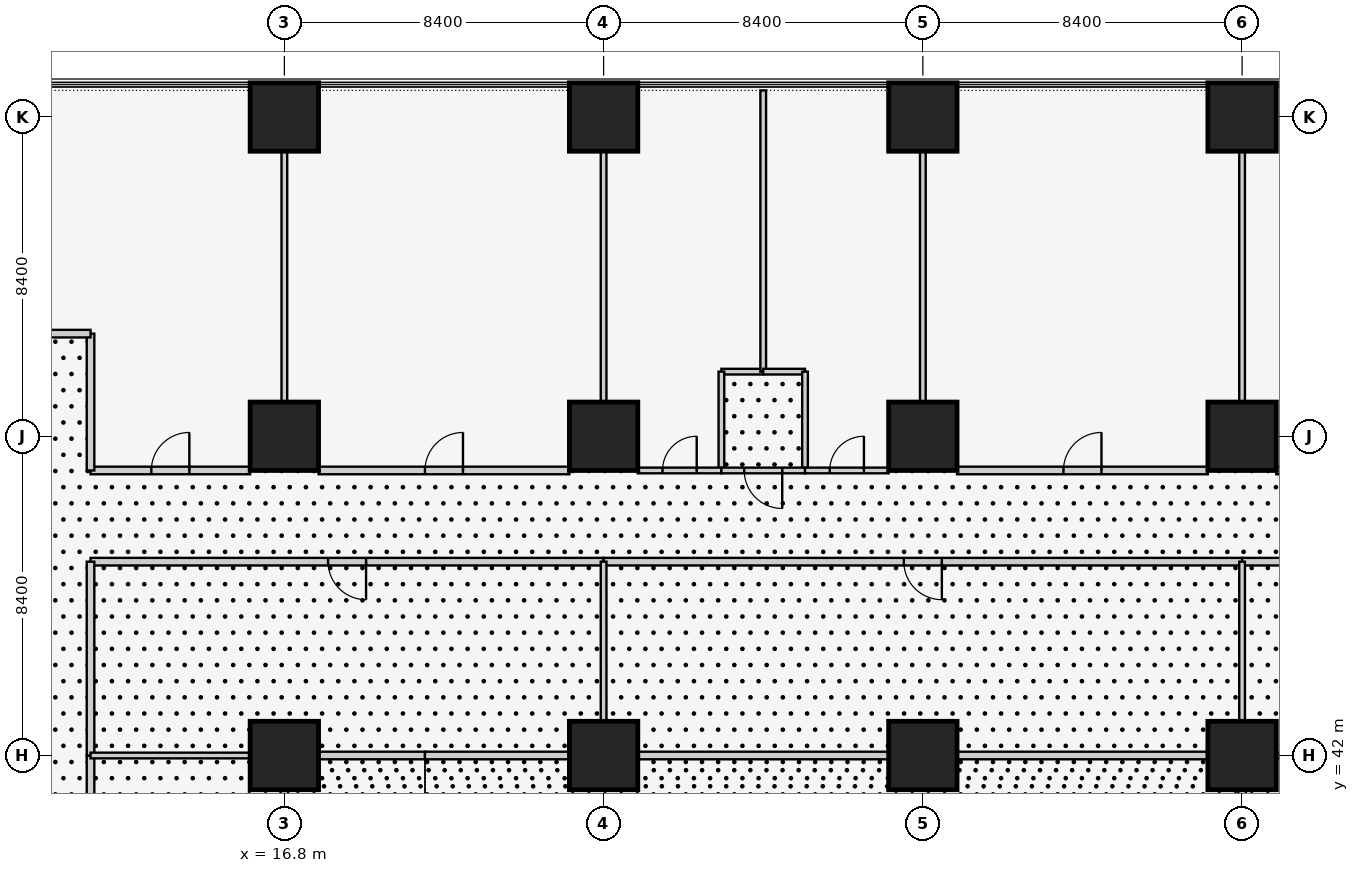
"""IFC4 building model, lengths in metres.
Left out: names, types, materials, properties, quantities, classifications, styles, units other than length and angle.
Written with IfcOpenShell. Run it as: python <this file> out.ifc"""

import sys

from ifc_helpers import new_model, si_unit, direction, frame, frame_2d, origin, origin_2d, place, context, subcontext, project, spatial, rectangle, extrude, element, fill, save


model = new_model("IFC4")
c1 = context("Model", 3, precision=1e-05, world=origin(), true_north=direction((0.0, 1.0)))
c2 = subcontext(c1, "Body", "Model", "MODEL_VIEW")
j1 = project(units=[si_unit("LENGTHUNIT", "METRE"), si_unit("PLANEANGLEUNIT", "RADIAN")], contexts=[c1])
p1 = place(None, origin())
s1 = spatial("IfcSite", under=j1, at=p1, CompositionType="ELEMENT")
p2 = place(p1, origin())
s2 = spatial("IfcBuilding", under=s1, at=p2, CompositionType="ELEMENT")
p3 = place(p2, frame((0.0, 0.0, 6.0)))
s3 = spatial("IfcBuildingStorey", under=s2, at=p3, CompositionType="ELEMENT", Elevation=6.0)
for number, where, z_axis, x_axis in (
    (1, (16.8, 42.0, 0.0), (0.0, 0.0, 1.0), (1.0, 0.0, 0.0)),
    (2, (16.8, 50.4, 0.0), (0.0, 0.0, 1.0), (1.0, 0.0, 0.0)),
    (3, (16.8, 58.8, 0.0), (0.0, 0.0, 1.0), (1.0, 0.0, 0.0)),
    (4, (25.2, 42.0, 0.0), (0.0, 0.0, 1.0), (1.0, 0.0, 0.0)),
    (5, (25.2, 50.4, 0.0), (0.0, 0.0, 1.0), (1.0, 0.0, 0.0)),
    (6, (25.2, 58.8, 0.0), (0.0, 0.0, 1.0), (1.0, 0.0, 0.0)),
    (7, (33.6, 42.0, 0.0), (0.0, 0.0, 1.0), (1.0, 0.0, 0.0)),
    (8, (33.6, 50.4, 0.0), (0.0, 0.0, 1.0), (1.0, 0.0, 0.0)),
    (9, (33.6, 58.8, 0.0), (0.0, 0.0, 1.0), (1.0, 0.0, 0.0)),
    (10, (42.0, 42.0, 0.0), (0.0, 0.0, 1.0), (1.0, 0.0, 0.0)),
    (11, (42.0, 50.4, 0.0), (0.0, 0.0, 1.0), (1.0, 0.0, 0.0)),
    (12, (42.0, 58.8, 0.0), (0.0, 0.0, 1.0), (1.0, 0.0, 0.0)),
):
    element("IfcColumn", number, at=place(p3, frame(where, z_axis=z_axis, x_axis=x_axis)), inside=s3, PredefinedType="COLUMN", context=c2, shape_type="SweptSolid", body=[
        extrude(rectangle(XDim=1.8, YDim=1.8, at=origin_2d()), origin(), (0.0, 0.0, 1.0), 4.5),
    ])
p4 = place(p3, frame((29.4, 52.1, 0.0), z_axis=(0.0, 0.0, 1.0), x_axis=(-1.0, 0.0, 0.0)))
e13 = element("IfcWall", 13, at=p4, inside=s3, PredefinedType="PARTITIONING", context=c2, shape_type="SweptSolid", body=[
    extrude(rectangle(XDim=1.1, YDim=0.15, at=frame_2d((0.55, 0.0))), origin(), (0.0, 0.0, 1.0), 4.3),
])
p5 = place(p3, frame((28.3, 52.1, 0.0), z_axis=(0.0, 0.0, 1.0), x_axis=(0.0, -1.0, 0.0)))
e14 = element("IfcWall", 14, at=p5, inside=s3, PredefinedType="PARTITIONING", context=c2, shape_type="SweptSolid", body=[
    extrude(rectangle(XDim=2.6, YDim=0.15, at=frame_2d((1.3, 0.0))), origin(), (0.0, 0.0, 1.0), 4.3),
])
p6 = place(p3, frame((29.4, 59.5, 0.0), z_axis=(0.0, 0.0, 1.0), x_axis=(0.0, -1.0, 0.0)))
e15 = element("IfcWall", 15, at=p6, inside=s3, PredefinedType="PARTITIONING", context=c2, shape_type="SweptSolid", body=[
    extrude(rectangle(XDim=7.4, YDim=0.15, at=frame_2d((3.7, 0.0))), origin(), (0.0, 0.0, 1.0), 3.688),
])
p7 = place(p3, frame((25.2, 51.3, 0.0), z_axis=(0.0, 0.0, 1.0), x_axis=(0.0, 1.0, 0.0)))
e16 = element("IfcWall", 16, at=p7, inside=s3, PredefinedType="PARTITIONING", context=c2, shape_type="SweptSolid", body=[
    extrude(rectangle(XDim=6.6, YDim=0.15, at=frame_2d((3.3, 0.0))), origin(), (0.0, 0.0, 1.0), 3.543),
])
p8 = place(p3, frame((28.3, 49.5, 0.0), z_axis=(0.0, 0.0, 1.0), x_axis=(-1.0, 0.0, 0.0)))
e17 = element("IfcWall", 17, at=p8, inside=s3, PredefinedType="PARTITIONING", context=c2, shape_type="SweptSolid", body=[
    extrude(rectangle(XDim=2.2, YDim=0.15, at=frame_2d((1.1, 0.0))), origin(), (0.0, 0.0, 1.0), 4.3),
])
p9 = place(p8, frame((0.65, 0.0, 0.0)))
e18 = element("IfcOpeningElement", 18, at=p9, cuts=e17, PredefinedType="OPENING", context=c2, shape_type="SweptSolid", body=[
    extrude(rectangle(XDim=0.9, YDim=2.1, at=frame_2d((0.45, 1.05))), frame((0.0, 0.085, 0.0), z_axis=(0.0, -1.0, 0.0), x_axis=(1.0, 0.0, 0.0)), (0.0, 0.0, 1.0), 0.17),
])
p10 = place(p3, frame((29.4, 52.1, 0.0), z_axis=(0.0, 0.0, 1.0), x_axis=(1.0, 0.0, 0.0)))
e19 = element("IfcWall", 19, at=p10, inside=s3, PredefinedType="PARTITIONING", context=c2, shape_type="SweptSolid", body=[
    extrude(rectangle(XDim=1.1, YDim=0.15, at=frame_2d((0.55, 0.0))), origin(), (0.0, 0.0, 1.0), 4.3),
])
p11 = place(p3, frame((30.5, 52.1, 0.0), z_axis=(0.0, 0.0, 1.0), x_axis=(0.0, -1.0, 0.0)))
e20 = element("IfcWall", 20, at=p11, inside=s3, PredefinedType="PARTITIONING", context=c2, shape_type="SweptSolid", body=[
    extrude(rectangle(XDim=2.6, YDim=0.15, at=frame_2d((1.3, 0.0))), origin(), (0.0, 0.0, 1.0), 4.3),
])
p12 = place(p3, frame((30.5, 49.5, 0.0), z_axis=(0.0, 0.0, 1.0), x_axis=(-1.0, 0.0, 0.0)))
e21 = element("IfcWall", 21, at=p12, inside=s3, PredefinedType="PARTITIONING", context=c2, shape_type="SweptSolid", body=[
    extrude(rectangle(XDim=2.2, YDim=0.15, at=frame_2d((1.1, 0.0))), origin(), (0.0, 0.0, 1.0), 4.3),
])
p13 = place(p12, frame((0.6, 0.0, 0.0)))
e22 = element("IfcOpeningElement", 22, at=p13, cuts=e21, PredefinedType="OPENING", context=c2, shape_type="SweptSolid", body=[
    extrude(rectangle(XDim=1.0, YDim=2.1, at=frame_2d((0.5, 1.05))), frame((0.0, 0.085, 0.0), z_axis=(0.0, -1.0, 0.0), x_axis=(1.0, 0.0, 0.0)), (0.0, 0.0, 1.0), 0.17),
])
p14 = place(p3, frame((33.6, 57.9, 0.0), z_axis=(0.0, 0.0, 1.0), x_axis=(0.0, -1.0, 0.0)))
e23 = element("IfcWall", 23, at=p14, inside=s3, PredefinedType="PARTITIONING", context=c2, shape_type="SweptSolid", body=[
    extrude(rectangle(XDim=6.6, YDim=0.15, at=frame_2d((3.3, 0.0))), origin(), (0.0, 0.0, 1.0), 3.543),
])
p15 = place(p3, frame((32.7, 49.5, 0.0), z_axis=(0.0, 0.0, 1.0), x_axis=(-1.0, 0.0, 0.0)))
e24 = element("IfcWall", 24, at=p15, inside=s3, PredefinedType="PARTITIONING", context=c2, shape_type="SweptSolid", body=[
    extrude(rectangle(XDim=2.2, YDim=0.15, at=frame_2d((1.1, 0.0))), origin(), (0.0, 0.0, 1.0), 4.3),
])
p16 = place(p15, frame((0.65, 0.0, 0.0)))
e25 = element("IfcOpeningElement", 25, at=p16, cuts=e24, PredefinedType="OPENING", context=c2, shape_type="SweptSolid", body=[
    extrude(rectangle(XDim=0.9, YDim=2.1, at=frame_2d((0.45, 1.05))), frame((0.0, 0.085, 0.0), z_axis=(0.0, -1.0, 0.0), x_axis=(1.0, 0.0, 0.0)), (0.0, 0.0, 1.0), 0.17),
])
p17 = place(p3, frame((16.8, 51.3, 0.0), z_axis=(0.0, 0.0, 1.0), x_axis=(0.0, 1.0, 0.0)))
e26 = element("IfcWall", 26, at=p17, inside=s3, PredefinedType="PARTITIONING", context=c2, shape_type="SweptSolid", body=[
    extrude(rectangle(XDim=6.6, YDim=0.15, at=frame_2d((3.3, 0.0))), origin(), (0.0, 0.0, 1.0), 3.543),
])
p18 = place(p3, frame((24.3, 49.5, 0.0), z_axis=(0.0, 0.0, 1.0), x_axis=(-1.0, 0.0, 0.0)))
e27 = element("IfcWall", 27, at=p18, inside=s3, PredefinedType="PARTITIONING", context=c2, shape_type="SweptSolid", body=[
    extrude(rectangle(XDim=6.6, YDim=0.2, at=frame_2d((3.3, 0.0))), origin(), (0.0, 0.0, 1.0), 4.3),
])
p19 = place(p18, frame((2.8, 0.0, 0.0)))
e28 = element("IfcOpeningElement", 28, at=p19, cuts=e27, PredefinedType="OPENING", context=c2, shape_type="SweptSolid", body=[
    extrude(rectangle(XDim=1.0, YDim=2.1, at=frame_2d((0.5, 1.05))), frame((0.0, 0.11, 0.0), z_axis=(0.0, -1.0, 0.0), x_axis=(1.0, 0.0, 0.0)), (0.0, 0.0, 1.0), 0.22),
])
p20 = place(p3, frame((42.0, 57.9, 0.0), z_axis=(0.0, 0.0, 1.0), x_axis=(0.0, -1.0, 0.0)))
e29 = element("IfcWall", 29, at=p20, inside=s3, PredefinedType="PARTITIONING", context=c2, shape_type="SweptSolid", body=[
    extrude(rectangle(XDim=6.6, YDim=0.15, at=frame_2d((3.3, 0.0))), origin(), (0.0, 0.0, 1.0), 3.543),
])
p21 = place(p3, frame((41.1, 49.5, 0.0), z_axis=(0.0, 0.0, 1.0), x_axis=(-1.0, 0.0, 0.0)))
e30 = element("IfcWall", 30, at=p21, inside=s3, PredefinedType="PARTITIONING", context=c2, shape_type="SweptSolid", body=[
    extrude(rectangle(XDim=6.6, YDim=0.2, at=frame_2d((3.3, 0.0))), origin(), (0.0, 0.0, 1.0), 4.3),
])
p22 = place(p21, frame((2.8, 0.0, 0.0)))
e31 = element("IfcOpeningElement", 31, at=p22, cuts=e30, PredefinedType="OPENING", context=c2, shape_type="SweptSolid", body=[
    extrude(rectangle(XDim=1.0, YDim=2.1, at=frame_2d((0.5, 1.05))), frame((0.0, 0.11, 0.0), z_axis=(0.0, -1.0, 0.0), x_axis=(1.0, 0.0, 0.0)), (0.0, 0.0, 1.0), 0.22),
])
p23 = place(p3, frame((15.9, 49.5, 0.0), z_axis=(0.0, 0.0, 1.0), x_axis=(-1.0, 0.0, 0.0)))
e32 = element("IfcWall", 32, at=p23, inside=s3, PredefinedType="PARTITIONING", context=c2, shape_type="SweptSolid", body=[
    extrude(rectangle(XDim=4.2, YDim=0.2, at=frame_2d((2.1, 0.0))), origin(), (0.0, 0.0, 1.0), 4.3),
])
p24 = place(p23, frame((1.6, 0.0, 0.0)))
e33 = element("IfcOpeningElement", 33, at=p24, cuts=e32, PredefinedType="OPENING", context=c2, shape_type="SweptSolid", body=[
    extrude(rectangle(XDim=1.0, YDim=2.1, at=frame_2d((0.5, 1.05))), frame((0.0, 0.11, 0.0), z_axis=(0.0, -1.0, 0.0), x_axis=(1.0, 0.0, 0.0)), (0.0, 0.0, 1.0), 0.22),
])
p25 = place(p3, frame((11.7, 49.5, 0.0), z_axis=(0.0, 0.0, 1.0), x_axis=(0.0, 1.0, 0.0)))
e34 = element("IfcWall", 34, at=p25, inside=s3, PredefinedType="PARTITIONING", context=c2, shape_type="SweptSolid", body=[
    extrude(rectangle(XDim=3.6, YDim=0.2, at=frame_2d((1.8, 0.0))), origin(), (0.0, 0.0, 1.0), 4.3),
])
p26 = place(p3, frame((11.7, 53.1, 0.0), z_axis=(0.0, 0.0, 1.0), x_axis=(-1.0, 0.0, 0.0)))
e35 = element("IfcWall", 35, at=p26, inside=s3, PredefinedType="PARTITIONING", context=c2, shape_type="SweptSolid", body=[
    extrude(rectangle(XDim=2.4, YDim=0.2, at=frame_2d((1.2, 0.0))), origin(), (0.0, 0.0, 1.0), 4.3),
])
p27 = place(p3, frame((47.1, 49.5, 0.0), z_axis=(0.0, 0.0, 1.0), x_axis=(-1.0, 0.0, 0.0)))
e36 = element("IfcWall", 36, at=p27, inside=s3, PredefinedType="PARTITIONING", context=c2, shape_type="SweptSolid", body=[
    extrude(rectangle(XDim=4.2, YDim=0.2, at=frame_2d((2.1, 0.0))), origin(), (0.0, 0.0, 1.0), 4.3),
])
p28 = place(p27, frame((1.6, 0.0, 0.0)))
e37 = element("IfcOpeningElement", 37, at=p28, cuts=e36, PredefinedType="OPENING", context=c2, shape_type="SweptSolid", body=[
    extrude(rectangle(XDim=1.0, YDim=2.1, at=frame_2d((0.5, 1.05))), frame((0.0, 0.11, 0.0), z_axis=(0.0, -1.0, 0.0), x_axis=(1.0, 0.0, 0.0)), (0.0, 0.0, 1.0), 0.22),
])
p29 = place(p3, frame((11.7, 42.0, 0.0), z_axis=(0.0, 0.0, 1.0), x_axis=(0.0, -1.0, 0.0)))
e38 = element("IfcWall", 38, at=p29, inside=s3, PredefinedType="PARTITIONING", context=c2, shape_type="SweptSolid", body=[
    extrude(rectangle(XDim=8.4, YDim=0.2, at=frame_2d((4.2, 0.0))), origin(), (0.0, 0.0, 1.0), 4.3),
])
p30 = place(p29, frame((3.7, 0.0, 0.0)))
e39 = element("IfcOpeningElement", 39, at=p30, cuts=e38, PredefinedType="OPENING", context=c2, shape_type="SweptSolid", body=[
    extrude(rectangle(XDim=1.0, YDim=2.1, at=frame_2d((0.5, 1.05))), frame((0.0, 0.11, 0.0), z_axis=(0.0, -1.0, 0.0), x_axis=(1.0, 0.0, 0.0)), (0.0, 0.0, 1.0), 0.22),
])
p31 = place(p3, frame((25.2, 47.1, 0.0), z_axis=(0.0, 0.0, 1.0), x_axis=(-1.0, 0.0, 0.0)))
e40 = element("IfcWall", 40, at=p31, inside=s3, PredefinedType="PARTITIONING", context=c2, shape_type="SweptSolid", body=[
    extrude(rectangle(XDim=13.5, YDim=0.2, at=frame_2d((6.75, 0.0))), origin(), (0.0, 0.0, 1.0), 4.3),
])
p32 = place(p31, frame((6.25, 0.0, 0.0)))
e41 = element("IfcOpeningElement", 41, at=p32, cuts=e40, PredefinedType="OPENING", context=c2, shape_type="SweptSolid", body=[
    extrude(rectangle(XDim=1.0, YDim=2.1, at=frame_2d((0.5, 1.05))), frame((0.0, 0.11, 0.0), z_axis=(0.0, -1.0, 0.0), x_axis=(1.0, 0.0, 0.0)), (0.0, 0.0, 1.0), 0.22),
])
p33 = place(p3, frame((11.7, 47.1, 0.0), z_axis=(0.0, 0.0, 1.0), x_axis=(0.0, -1.0, 0.0)))
e42 = element("IfcWall", 42, at=p33, inside=s3, PredefinedType="PARTITIONING", context=c2, shape_type="SweptSolid", body=[
    extrude(rectangle(XDim=5.1, YDim=0.2, at=frame_2d((2.55, 0.0))), origin(), (0.0, 0.0, 1.0), 4.3),
])
p34 = place(p3, frame((42.0, 47.1, 0.0), z_axis=(0.0, 0.0, 1.0), x_axis=(-1.0, 0.0, 0.0)))
e43 = element("IfcWall", 43, at=p34, inside=s3, PredefinedType="PARTITIONING", context=c2, shape_type="SweptSolid", body=[
    extrude(rectangle(XDim=16.8, YDim=0.2, at=frame_2d((8.4, 0.0))), origin(), (0.0, 0.0, 1.0), 4.3),
])
p35 = place(p34, frame((7.9, 0.0, 0.0)))
e44 = element("IfcOpeningElement", 44, at=p35, cuts=e43, PredefinedType="OPENING", context=c2, shape_type="SweptSolid", body=[
    extrude(rectangle(XDim=1.0, YDim=2.1, at=frame_2d((0.5, 1.05))), frame((0.0, 0.11, 0.0), z_axis=(0.0, -1.0, 0.0), x_axis=(1.0, 0.0, 0.0)), (0.0, 0.0, 1.0), 0.22),
])
p36 = place(p3, frame((47.1, 47.1, 0.0), z_axis=(0.0, 0.0, 1.0), x_axis=(-1.0, 0.0, 0.0)))
e45 = element("IfcWall", 45, at=p36, inside=s3, PredefinedType="PARTITIONING", context=c2, shape_type="SweptSolid", body=[
    extrude(rectangle(XDim=5.1, YDim=0.2, at=frame_2d((2.55, 0.0))), origin(), (0.0, 0.0, 1.0), 4.3),
])
p37 = place(p3, frame((16.8, 34.5, 0.0), z_axis=(0.0, 0.0, 1.0), x_axis=(0.0, 1.0, 0.0)))
e46 = element("IfcWall", 46, at=p37, inside=s3, PredefinedType="PARTITIONING", context=c2, shape_type="SweptSolid", body=[
    extrude(rectangle(XDim=6.6, YDim=0.2, at=frame_2d((3.3, 0.0))), origin(), (0.0, 0.0, 1.0), 3.543),
])
p38 = place(p3, frame((17.7, 42.0, 0.0), z_axis=(0.0, 0.0, 1.0), x_axis=(1.0, 0.0, 0.0)))
e47 = element("IfcWall", 47, at=p38, inside=s3, PredefinedType="PARTITIONING", context=c2, shape_type="SweptSolid", body=[
    extrude(rectangle(XDim=2.8, YDim=0.2, at=frame_2d((1.4, 0.0))), origin(), (0.0, 0.0, 1.0), 3.543),
])
p39 = place(p3, frame((42.0, 41.1, 0.0), z_axis=(0.0, 0.0, 1.0), x_axis=(0.0, -1.0, 0.0)))
e48 = element("IfcWall", 48, at=p39, inside=s3, PredefinedType="PARTITIONING", context=c2, shape_type="SweptSolid", body=[
    extrude(rectangle(XDim=6.6, YDim=0.2, at=frame_2d((3.3, 0.0))), origin(), (0.0, 0.0, 1.0), 3.543),
])
p40 = place(p3, frame((20.5, 42.0, 0.0), z_axis=(0.0, 0.0, 1.0), x_axis=(1.0, 0.0, 0.0)))
e49 = element("IfcWall", 49, at=p40, inside=s3, PredefinedType="PARTITIONING", context=c2, shape_type="SweptSolid", body=[
    extrude(rectangle(XDim=3.8, YDim=0.2, at=frame_2d((1.9, 0.0))), origin(), (0.0, 0.0, 1.0), 3.543),
])
p41 = place(p3, frame((26.1, 42.0, 0.0), z_axis=(0.0, 0.0, 1.0), x_axis=(1.0, 0.0, 0.0)))
e50 = element("IfcWall", 50, at=p41, inside=s3, PredefinedType="PARTITIONING", context=c2, shape_type="SweptSolid", body=[
    extrude(rectangle(XDim=6.6, YDim=0.2, at=frame_2d((3.3, 0.0))), origin(), (0.0, 0.0, 1.0), 3.543),
])
p42 = place(p3, frame((34.5, 42.0, 0.0), z_axis=(0.0, 0.0, 1.0), x_axis=(1.0, 0.0, 0.0)))
e51 = element("IfcWall", 51, at=p42, inside=s3, PredefinedType="PARTITIONING", context=c2, shape_type="SweptSolid", body=[
    extrude(rectangle(XDim=6.6, YDim=0.2, at=frame_2d((3.3, 0.0))), origin(), (0.0, 0.0, 1.0), 3.543),
])
p43 = place(p3, frame((11.7, 42.0, 0.0), z_axis=(0.0, 0.0, 1.0), x_axis=(1.0, 0.0, 0.0)))
e52 = element("IfcWall", 52, at=p43, inside=s3, PredefinedType="PARTITIONING", context=c2, shape_type="SweptSolid", body=[
    extrude(rectangle(XDim=4.2, YDim=0.15, at=frame_2d((2.1, 0.0))), origin(), (0.0, 0.0, 1.0), 3.543),
])
for number, where, z_axis, x_axis in (
    (53, (42.9, 42.0, 0.0), (0.0, 0.0, 1.0), (1.0, 0.0, 0.0)),
    (54, (25.2, 47.1, 0.0), (0.0, 0.0, 1.0), (0.0, -1.0, 0.0)),
    (55, (42.0, 47.1, 0.0), (0.0, 0.0, 1.0), (0.0, -1.0, 0.0)),
):
    element("IfcWall", number, at=place(p3, frame(where, z_axis=z_axis, x_axis=x_axis)), inside=s3, PredefinedType="PARTITIONING", context=c2, shape_type="SweptSolid", body=[
        extrude(rectangle(XDim=4.2, YDim=0.15, at=frame_2d((2.1, 0.0))), origin(), (0.0, 0.0, 1.0), 3.543),
    ])
p44 = place(p9, frame((0.9, 0.0, 0.0), z_axis=(0.0, 0.0, 1.0), x_axis=(-1.0, 0.0, 0.0)))
e56 = element("IfcDoor", 56, at=p44, inside=s3, OperationType="SINGLE_SWING_RIGHT", PredefinedType="DOOR", context=c2, shape_type="SweptSolid", body=[
    extrude(rectangle(XDim=0.9, YDim=2.1, at=frame_2d((0.45, 1.05))), frame((0.0, 0.025, 0.0), z_axis=(0.0, -1.0, 0.0), x_axis=(1.0, 0.0, 0.0)), (0.0, 0.0, 1.0), 0.05),
])
fill(e18, e56)
p45 = place(p13, origin())
e57 = element("IfcDoor", 57, at=p45, inside=s3, OperationType="SINGLE_SWING_LEFT", PredefinedType="DOOR", context=c2, shape_type="SweptSolid", body=[
    extrude(rectangle(XDim=1.0, YDim=2.1, at=frame_2d((0.5, 1.05))), frame((0.0, 0.025, 0.0), z_axis=(0.0, -1.0, 0.0), x_axis=(1.0, 0.0, 0.0)), (0.0, 0.0, 1.0), 0.05),
])
fill(e22, e57)
p46 = place(p16, frame((0.9, 0.0, 0.0), z_axis=(0.0, 0.0, 1.0), x_axis=(-1.0, 0.0, 0.0)))
e58 = element("IfcDoor", 58, at=p46, inside=s3, OperationType="SINGLE_SWING_RIGHT", PredefinedType="DOOR", context=c2, shape_type="SweptSolid", body=[
    extrude(rectangle(XDim=0.9, YDim=2.1, at=frame_2d((0.45, 1.05))), frame((0.0, 0.025, 0.0), z_axis=(0.0, -1.0, 0.0), x_axis=(1.0, 0.0, 0.0)), (0.0, 0.0, 1.0), 0.05),
])
fill(e25, e58)
p47 = place(p19, frame((1.0, 0.0, 0.0), z_axis=(0.0, 0.0, 1.0), x_axis=(-1.0, 0.0, 0.0)))
e59 = element("IfcDoor", 59, at=p47, inside=s3, OperationType="SINGLE_SWING_RIGHT", PredefinedType="DOOR", context=c2, shape_type="SweptSolid", body=[
    extrude(rectangle(XDim=1.0, YDim=2.1, at=frame_2d((0.5, 1.05))), frame((0.0, 0.025, 0.0), z_axis=(0.0, -1.0, 0.0), x_axis=(1.0, 0.0, 0.0)), (0.0, 0.0, 1.0), 0.05),
])
fill(e28, e59)
p48 = place(p22, frame((1.0, 0.0, 0.0), z_axis=(0.0, 0.0, 1.0), x_axis=(-1.0, 0.0, 0.0)))
e60 = element("IfcDoor", 60, at=p48, inside=s3, OperationType="SINGLE_SWING_RIGHT", PredefinedType="DOOR", context=c2, shape_type="SweptSolid", body=[
    extrude(rectangle(XDim=1.0, YDim=2.1, at=frame_2d((0.5, 1.05))), frame((0.0, 0.025, 0.0), z_axis=(0.0, -1.0, 0.0), x_axis=(1.0, 0.0, 0.0)), (0.0, 0.0, 1.0), 0.05),
])
fill(e31, e60)
p49 = place(p24, frame((1.0, 0.0, 0.0), z_axis=(0.0, 0.0, 1.0), x_axis=(-1.0, 0.0, 0.0)))
e61 = element("IfcDoor", 61, at=p49, inside=s3, OperationType="SINGLE_SWING_RIGHT", PredefinedType="DOOR", context=c2, shape_type="SweptSolid", body=[
    extrude(rectangle(XDim=1.0, YDim=2.1, at=frame_2d((0.5, 1.05))), frame((0.0, 0.025, 0.0), z_axis=(0.0, -1.0, 0.0), x_axis=(1.0, 0.0, 0.0)), (0.0, 0.0, 1.0), 0.05),
])
fill(e33, e61)
p50 = place(p32, origin())
e62 = element("IfcDoor", 62, at=p50, inside=s3, OperationType="SINGLE_SWING_LEFT", PredefinedType="DOOR", context=c2, shape_type="SweptSolid", body=[
    extrude(rectangle(XDim=1.0, YDim=2.1, at=frame_2d((0.5, 1.05))), frame((0.0, 0.025, 0.0), z_axis=(0.0, -1.0, 0.0), x_axis=(1.0, 0.0, 0.0)), (0.0, 0.0, 1.0), 0.05),
])
fill(e41, e62)
p51 = place(p35, origin())
e63 = element("IfcDoor", 63, at=p51, inside=s3, OperationType="SINGLE_SWING_LEFT", PredefinedType="DOOR", context=c2, shape_type="SweptSolid", body=[
    extrude(rectangle(XDim=1.0, YDim=2.1, at=frame_2d((0.5, 1.05))), frame((0.0, 0.025, 0.0), z_axis=(0.0, -1.0, 0.0), x_axis=(1.0, 0.0, 0.0)), (0.0, 0.0, 1.0), 0.05),
])
fill(e44, e63)
save(model, sys.argv[1])
